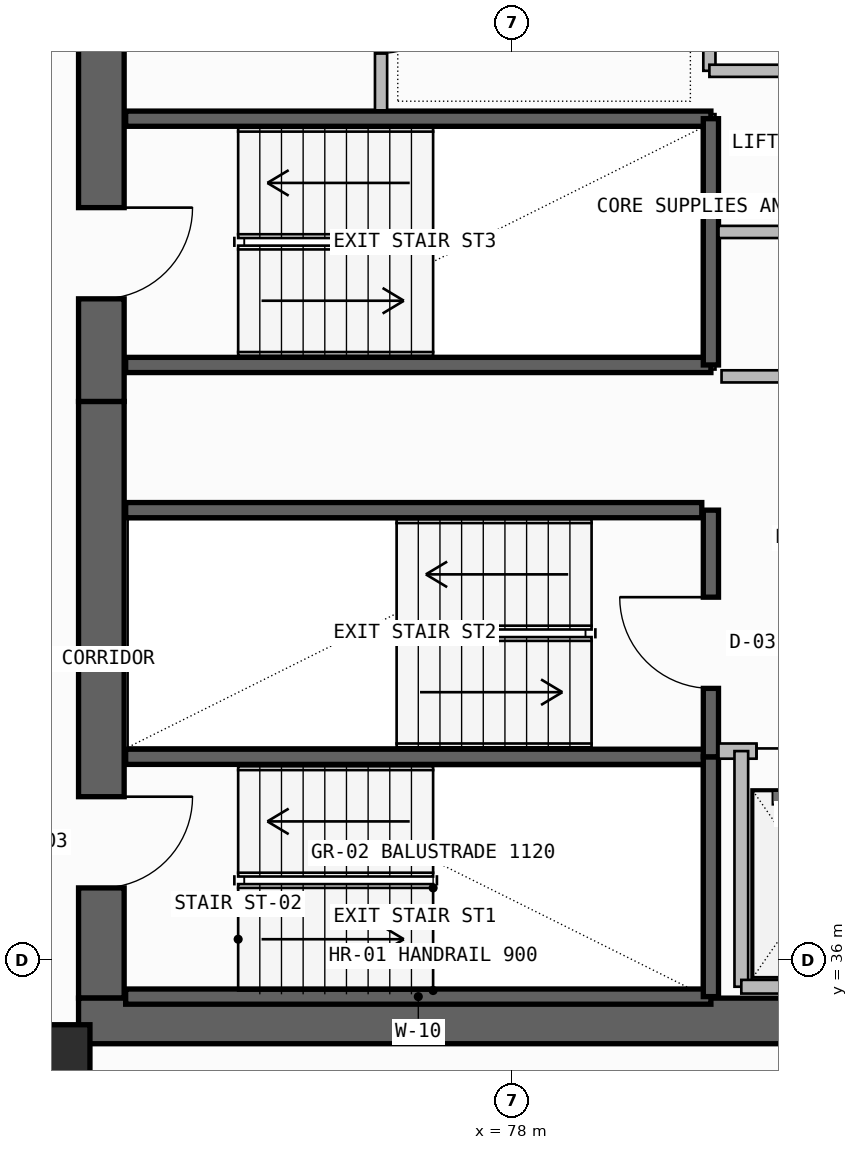
"""IFC4 building model, lengths in metres.
Left out: names, types, materials, properties, quantities, classifications, styles, units other than length and angle.
Written with IfcOpenShell. Run it as: python <this file> out.ifc"""

import sys

from ifc_helpers import new_model, si_unit, direction, frame, frame_2d, origin, origin_2d, place, context, subcontext, project, spatial, rectangle, extrude, element, fill, save


model = new_model("IFC4")
c1 = context("Model", 3, precision=1e-05, world=origin(), true_north=direction((0.0, 1.0)))
c2 = subcontext(c1, "Body", "Model", "MODEL_VIEW")
j1 = project(units=[si_unit("LENGTHUNIT", "METRE"), si_unit("PLANEANGLEUNIT", "RADIAN")], contexts=[c1])
p1 = place(None, origin())
s1 = spatial("IfcSite", under=j1, at=p1, CompositionType="ELEMENT")
p2 = place(p1, origin())
s2 = spatial("IfcBuilding", under=s1, at=p2, CompositionType="ELEMENT")
p3 = place(p2, frame((0.0, 0.0, 232.58)))
s3 = spatial("IfcBuildingStorey", under=s2, at=p3, CompositionType="ELEMENT", Elevation=232.58)
p4 = place(p3, frame((72.6, 35.5, -0.26), z_axis=(0.0, 0.0, 1.0), x_axis=(0.0, 1.0, 0.0)))
e1 = element("IfcWall", 1, at=p4, inside=s3, PredefinedType="SHEAR", context=c2, shape_type="SweptSolid", body=[
    extrude(rectangle(XDim=7.85, YDim=0.6, at=frame_2d((3.925, 0.0))), origin(), (0.0, 0.0, 1.0), 3.52),
])
p5 = place(p4, frame((1.45, 0.0, 0.26)))
e2 = element("IfcOpeningElement", 2, at=p5, cuts=e1, PredefinedType="OPENING", context=c2, shape_type="SweptSolid", body=[
    extrude(rectangle(XDim=1.2, YDim=2.2, at=frame_2d((0.6, 1.1))), frame((0.0, 0.31, 0.0), z_axis=(0.0, -1.0, 0.0), x_axis=(1.0, 0.0, 0.0)), (0.0, 0.0, 1.0), 0.62),
])
p6 = place(p3, frame((72.3, 35.2, -0.26), z_axis=(0.0, 0.0, 1.0), x_axis=(1.0, 0.0, 0.0)))
e3 = element("IfcWall", 3, at=p6, inside=s3, PredefinedType="SHEAR", context=c2, shape_type="SweptSolid", body=[
    extrude(rectangle(XDim=13.3, YDim=0.6, at=frame_2d((6.65, 0.0))), origin(), (0.0, 0.0, 1.0), 3.52),
])
p7 = place(p3, frame((72.6, 43.35, -0.26), z_axis=(0.0, 0.0, 1.0), x_axis=(0.0, 1.0, 0.0)))
e4 = element("IfcWall", 4, at=p7, inside=s3, PredefinedType="SHEAR", context=c2, shape_type="SweptSolid", body=[
    extrude(rectangle(XDim=12.7, YDim=0.6, at=frame_2d((6.35, 0.0))), origin(), (0.0, 0.0, 1.0), 3.52),
])
p8 = place(p7, frame((1.35, 0.0, 0.26)))
e5 = element("IfcOpeningElement", 5, at=p8, cuts=e4, PredefinedType="OPENING", context=c2, shape_type="SweptSolid", body=[
    extrude(rectangle(XDim=1.2, YDim=2.2, at=frame_2d((0.6, 1.1))), frame((0.0, 0.31, 0.0), z_axis=(0.0, -1.0, 0.0), x_axis=(1.0, 0.0, 0.0)), (0.0, 0.0, 1.0), 0.62),
])
p9 = place(p3, frame((72.0, 34.7, 0.0), z_axis=(0.0, 0.0, 1.0), x_axis=(1.0, 0.0, 0.0)))
e6 = element("IfcColumn", 6, at=p9, inside=s3, PredefinedType="COLUMN", context=c2, shape_type="SweptSolid", body=[
    extrude(rectangle(XDim=0.9, YDim=0.9, at=origin_2d()), origin(), (0.0, 0.0, 1.0), 3.52),
])
for number, where, z_axis, x_axis in (
    (7, (72.92, 35.52, -0.26), (0.0, 0.0, 1.0), (1.0, 0.0, 0.0)),
    (8, (72.92, 38.675, -0.26), (0.0, 0.0, 1.0), (1.0, 0.0, 0.0)),
):
    element("IfcWall", number, at=place(p3, frame(where, z_axis=z_axis, x_axis=x_axis)), inside=s3, PredefinedType="SOLIDWALL", context=c2, shape_type="SweptSolid", body=[
        extrude(rectangle(XDim=7.7, YDim=0.2, at=frame_2d((3.85, 0.0))), origin(), (0.0, 0.0, 1.0), 3.52),
    ])
p10 = place(p3, frame((80.62, 35.52, -0.26), z_axis=(0.0, 0.0, 1.0), x_axis=(0.0, 1.0, 0.0)))
e9 = element("IfcWall", 9, at=p10, inside=s3, PredefinedType="SOLIDWALL", context=c2, shape_type="SweptSolid", body=[
    extrude(rectangle(XDim=3.155, YDim=0.2, at=frame_2d((1.578, 0.0))), origin(), (0.0, 0.0, 1.0), 3.52),
])
p11 = place(p3, frame((80.62, 38.675, -0.26), z_axis=(0.0, 0.0, 1.0), x_axis=(0.0, 1.0, 0.0)))
e10 = element("IfcWall", 10, at=p11, inside=s3, PredefinedType="SOLIDWALL", context=c2, shape_type="SweptSolid", body=[
    extrude(rectangle(XDim=3.245, YDim=0.2, at=frame_2d((1.623, 0.0))), origin(), (0.0, 0.0, 1.0), 3.52),
])
p12 = place(p11, frame((0.9, 0.0, 0.26)))
e11 = element("IfcOpeningElement", 11, at=p12, cuts=e10, PredefinedType="OPENING", context=c2, shape_type="SweptSolid", body=[
    extrude(rectangle(XDim=1.2, YDim=2.2, at=frame_2d((0.6, 1.1))), frame((0.0, 0.11, 0.0), z_axis=(0.0, -1.0, 0.0), x_axis=(1.0, 0.0, 0.0)), (0.0, 0.0, 1.0), 0.22),
])
p13 = place(p3, frame((80.72, 38.75, 0.0), z_axis=(0.0, 0.0, 1.0), x_axis=(1.0, 0.0, 0.0)))
e12 = element("IfcWall", 12, at=p13, inside=s3, PredefinedType="SOLIDWALL", context=c2, shape_type="SweptSolid", body=[
    extrude(rectangle(XDim=4.26, YDim=0.2, at=frame_2d((2.13, 0.0))), origin(), (0.0, 0.0, 1.0), 3.26),
])
p14 = place(p13, frame((0.5, 0.0, 0.0)))
e13 = element("IfcOpeningElement", 13, at=p14, cuts=e12, PredefinedType="OPENING", context=c2, shape_type="SweptSolid", body=[
    extrude(rectangle(XDim=1.3, YDim=2.3, at=frame_2d((0.65, 1.15))), frame((0.0, 0.11, 0.0), z_axis=(0.0, -1.0, 0.0), x_axis=(1.0, 0.0, 0.0)), (0.0, 0.0, 1.0), 0.22),
])
p15 = place(p13, frame((2.45, 0.0, 0.0)))
e14 = element("IfcOpeningElement", 14, at=p15, cuts=e12, PredefinedType="OPENING", context=c2, shape_type="SweptSolid", body=[
    extrude(rectangle(XDim=1.3, YDim=2.3, at=frame_2d((0.65, 1.15))), frame((0.0, 0.11, 0.0), z_axis=(0.0, -1.0, 0.0), x_axis=(1.0, 0.0, 0.0)), (0.0, 0.0, 1.0), 0.22),
])
p16 = place(p3, frame((81.02, 35.65, 0.0), z_axis=(0.0, 0.0, 1.0), x_axis=(0.0, 1.0, 0.0)))
e15 = element("IfcWall", 15, at=p16, inside=s3, PredefinedType="SOLIDWALL", context=c2, shape_type="SweptSolid", body=[
    extrude(rectangle(XDim=3.1, YDim=0.18, at=frame_2d((1.55, 0.0))), origin(), (0.0, 0.0, 1.0), 3.26),
])
p17 = place(p3, frame((81.02, 35.65, 0.0), z_axis=(0.0, 0.0, 1.0), x_axis=(1.0, 0.0, 0.0)))
e16 = element("IfcWall", 16, at=p17, inside=s3, PredefinedType="SOLIDWALL", context=c2, shape_type="SweptSolid", body=[
    extrude(rectangle(XDim=3.93, YDim=0.18, at=frame_2d((1.965, 0.0))), origin(), (0.0, 0.0, 1.0), 3.26),
])
p18 = place(p3, frame((72.92, 41.92, -0.26), z_axis=(0.0, 0.0, 1.0), x_axis=(1.0, 0.0, 0.0)))
e17 = element("IfcWall", 17, at=p18, inside=s3, PredefinedType="SOLIDWALL", context=c2, shape_type="SweptSolid", body=[
    extrude(rectangle(XDim=7.58, YDim=0.2, at=frame_2d((3.79, 0.0))), origin(), (0.0, 0.0, 1.0), 3.52),
])
for number, where, z_axis, x_axis in (
    (18, (72.92, 43.83, -0.26), (0.0, 0.0, 1.0), (1.0, 0.0, 0.0)),
    (19, (72.92, 47.07, -0.26), (0.0, 0.0, 1.0), (1.0, 0.0, 0.0)),
):
    element("IfcWall", number, at=place(p3, frame(where, z_axis=z_axis, x_axis=x_axis)), inside=s3, PredefinedType="SOLIDWALL", context=c2, shape_type="SweptSolid", body=[
        extrude(rectangle(XDim=7.7, YDim=0.2, at=frame_2d((3.85, 0.0))), origin(), (0.0, 0.0, 1.0), 3.52),
    ])
p19 = place(p3, frame((80.62, 43.83, -0.26), z_axis=(0.0, 0.0, 1.0), x_axis=(0.0, 1.0, 0.0)))
e20 = element("IfcWall", 20, at=p19, inside=s3, PredefinedType="SOLIDWALL", context=c2, shape_type="SweptSolid", body=[
    extrude(rectangle(XDim=3.24, YDim=0.2, at=frame_2d((1.62, 0.0))), origin(), (0.0, 0.0, 1.0), 3.52),
])
p20 = place(p3, frame((80.72, 45.58, 0.0), z_axis=(0.0, 0.0, 1.0), x_axis=(1.0, 0.0, 0.0)))
e21 = element("IfcWall", 21, at=p20, inside=s3, PredefinedType="PLUMBINGWALL", context=c2, shape_type="SweptSolid", body=[
    extrude(rectangle(XDim=4.23, YDim=0.16, at=frame_2d((2.115, 0.0))), origin(), (0.0, 0.0, 1.0), 3.26),
])
p21 = place(p20, frame((1.65, 0.0, 0.0)))
e22 = element("IfcOpeningElement", 22, at=p21, cuts=e21, PredefinedType="OPENING", context=c2, shape_type="SweptSolid", body=[
    extrude(rectangle(XDim=0.9, YDim=2.1, at=frame_2d((0.45, 1.05))), frame((0.0, 0.09, 0.0), z_axis=(0.0, -1.0, 0.0), x_axis=(1.0, 0.0, 0.0)), (0.0, 0.0, 1.0), 0.18),
])
p22 = place(p3, frame((80.76, 43.68, 0.0), z_axis=(0.0, 0.0, 1.0), x_axis=(1.0, 0.0, 0.0)))
e23 = element("IfcWall", 23, at=p22, inside=s3, PredefinedType="PLUMBINGWALL", context=c2, shape_type="SweptSolid", body=[
    extrude(rectangle(XDim=4.19, YDim=0.16, at=frame_2d((2.095, 0.0))), origin(), (0.0, 0.0, 1.0), 3.26),
])
p23 = place(p3, frame((76.28, 47.18, 0.0), z_axis=(0.0, 0.0, 1.0), x_axis=(0.0, 1.0, 0.0)))
e24 = element("IfcWall", 24, at=p23, inside=s3, PredefinedType="SOLIDWALL", context=c2, shape_type="SweptSolid", body=[
    extrude(rectangle(XDim=5.14, YDim=0.16, at=frame_2d((2.57, 0.0))), origin(), (0.0, 0.0, 1.0), 3.26),
])
p24 = place(p23, frame((0.75, 0.0, 0.0)))
e25 = element("IfcOpeningElement", 25, at=p24, cuts=e24, PredefinedType="OPENING", context=c2, shape_type="SweptSolid", body=[
    extrude(rectangle(XDim=1.0, YDim=2.2, at=frame_2d((0.5, 1.1))), frame((0.0, 0.09, 0.0), z_axis=(0.0, -1.0, 0.0), x_axis=(1.0, 0.0, 0.0)), (0.0, 0.0, 1.0), 0.18),
])
p25 = place(p23, frame((3.2, 0.0, 0.0)))
e26 = element("IfcOpeningElement", 26, at=p25, cuts=e24, PredefinedType="OPENING", context=c2, shape_type="SweptSolid", body=[
    extrude(rectangle(XDim=0.9, YDim=2.1, at=frame_2d((0.45, 1.05))), frame((0.0, 0.09, 0.0), z_axis=(0.0, -1.0, 0.0), x_axis=(1.0, 0.0, 0.0)), (0.0, 0.0, 1.0), 0.18),
])
p26 = place(p3, frame((80.6, 47.7, 0.0), z_axis=(0.0, 0.0, 1.0), x_axis=(0.0, 1.0, 0.0)))
e27 = element("IfcWall", 27, at=p26, inside=s3, PredefinedType="SOLIDWALL", context=c2, shape_type="SweptSolid", body=[
    extrude(rectangle(XDim=4.6, YDim=0.16, at=frame_2d((2.3, 0.0))), origin(), (0.0, 0.0, 1.0), 3.26),
])
p27 = place(p26, frame((0.75, 0.0, 0.0)))
e28 = element("IfcOpeningElement", 28, at=p27, cuts=e27, PredefinedType="OPENING", context=c2, shape_type="SweptSolid", body=[
    extrude(rectangle(XDim=1.0, YDim=2.2, at=frame_2d((0.5, 1.1))), frame((0.0, 0.09, 0.0), z_axis=(0.0, -1.0, 0.0), x_axis=(1.0, 0.0, 0.0)), (0.0, 0.0, 1.0), 0.18),
])
p28 = place(p26, frame((2.95, 0.0, 0.0)))
e29 = element("IfcOpeningElement", 29, at=p28, cuts=e27, PredefinedType="OPENING", context=c2, shape_type="SweptSolid", body=[
    extrude(rectangle(XDim=0.9, YDim=2.1, at=frame_2d((0.45, 1.05))), frame((0.0, 0.09, 0.0), z_axis=(0.0, -1.0, 0.0), x_axis=(1.0, 0.0, 0.0)), (0.0, 0.0, 1.0), 0.18),
])
p29 = place(p3, frame((80.6, 47.7, 0.0), z_axis=(0.0, 0.0, 1.0), x_axis=(1.0, 0.0, 0.0)))
e30 = element("IfcWall", 30, at=p29, inside=s3, PredefinedType="SOLIDWALL", context=c2, shape_type="SweptSolid", body=[
    extrude(rectangle(XDim=4.4, YDim=0.16, at=frame_2d((2.2, 0.0))), origin(), (0.0, 0.0, 1.0), 3.26),
])
p30 = place(p5, frame((1.2, 0.0, 0.0), z_axis=(0.0, 0.0, 1.0), x_axis=(-1.0, 0.0, 0.0)))
e31 = element("IfcDoor", 31, at=p30, inside=s3, OperationType="SINGLE_SWING_LEFT", PredefinedType="USERDEFINED", context=c2, shape_type="SweptSolid", body=[
    extrude(rectangle(XDim=1.2, YDim=2.2, at=frame_2d((0.6, 1.1))), frame((0.0, 0.025, 0.0), z_axis=(0.0, -1.0, 0.0), x_axis=(1.0, 0.0, 0.0)), (0.0, 0.0, 1.0), 0.05),
])
fill(e2, e31)
p31 = place(p12, origin())
e32 = element("IfcDoor", 32, at=p31, inside=s3, OperationType="SINGLE_SWING_RIGHT", PredefinedType="USERDEFINED", context=c2, shape_type="SweptSolid", body=[
    extrude(rectangle(XDim=1.2, YDim=2.2, at=frame_2d((0.6, 1.1))), frame((0.0, 0.025, 0.0), z_axis=(0.0, -1.0, 0.0), x_axis=(1.0, 0.0, 0.0)), (0.0, 0.0, 1.0), 0.05),
])
fill(e11, e32)
p32 = place(p14, origin())
e33 = element("IfcDoor", 33, at=p32, inside=s3, OperationType="DOUBLE_DOOR_SLIDING", PredefinedType="DOOR", context=c2, shape_type="SweptSolid", body=[
    extrude(rectangle(XDim=1.3, YDim=2.3, at=frame_2d((0.65, 1.15))), frame((0.0, 0.025, 0.0), z_axis=(0.0, -1.0, 0.0), x_axis=(1.0, 0.0, 0.0)), (0.0, 0.0, 1.0), 0.05),
])
fill(e13, e33)
p33 = place(p8, frame((1.2, 0.0, 0.0), z_axis=(0.0, 0.0, 1.0), x_axis=(-1.0, 0.0, 0.0)))
e34 = element("IfcDoor", 34, at=p33, inside=s3, OperationType="SINGLE_SWING_LEFT", PredefinedType="USERDEFINED", context=c2, shape_type="SweptSolid", body=[
    extrude(rectangle(XDim=1.2, YDim=2.2, at=frame_2d((0.6, 1.1))), frame((0.0, 0.025, 0.0), z_axis=(0.0, -1.0, 0.0), x_axis=(1.0, 0.0, 0.0)), (0.0, 0.0, 1.0), 0.05),
])
fill(e5, e34)
p34 = place(p24, frame((1.0, 0.0, 0.0), z_axis=(0.0, 0.0, 1.0), x_axis=(-1.0, 0.0, 0.0)))
e35 = element("IfcDoor", 35, at=p34, inside=s3, OperationType="SINGLE_SWING_LEFT", PredefinedType="DOOR", context=c2, shape_type="SweptSolid", body=[
    extrude(rectangle(XDim=1.0, YDim=2.2, at=frame_2d((0.5, 1.1))), frame((0.0, 0.025, 0.0), z_axis=(0.0, -1.0, 0.0), x_axis=(1.0, 0.0, 0.0)), (0.0, 0.0, 1.0), 0.05),
])
fill(e25, e35)
save(model, sys.argv[1])
